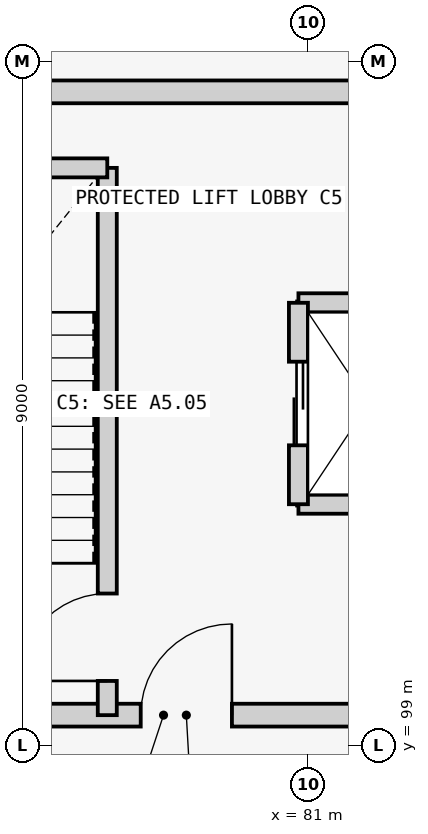
"""IFC4 building model, lengths in metres.
Left out: names, types, materials, properties, quantities, classifications, styles, units other than length and angle.
Written with IfcOpenShell. Run it as: python <this file> out.ifc"""

import sys

from ifc_helpers import new_model, si_unit, direction, frame, frame_2d, origin, place, context, subcontext, project, spatial, rectangle, extrude, element, fill, save


model = new_model("IFC4")
c1 = context("Model", 3, precision=1e-05, world=origin(), true_north=direction((0.0, 1.0)))
c2 = subcontext(c1, "Body", "Model", "MODEL_VIEW")
j1 = project(units=[si_unit("LENGTHUNIT", "METRE"), si_unit("PLANEANGLEUNIT", "RADIAN")], contexts=[c1])
p1 = place(None, origin())
s1 = spatial("IfcSite", under=j1, at=p1, CompositionType="ELEMENT")
p2 = place(p1, origin())
s2 = spatial("IfcBuilding", under=s1, at=p2, CompositionType="ELEMENT")
p3 = place(p2, frame((0.0, 0.0, 8.4)))
s3 = spatial("IfcBuildingStorey", under=s2, at=p3, CompositionType="ELEMENT", Elevation=8.4)
p4 = place(p3, frame((74.0, 99.4, 0.0), z_axis=(0.0, 0.0, 1.0), x_axis=(1.0, 0.0, 0.0)))
e1 = element("IfcWall", 1, at=p4, inside=s3, PredefinedType="SHEAR", context=c2, shape_type="SweptSolid", body=[
    extrude(rectangle(XDim=10.2, YDim=0.3, at=frame_2d((5.1, 0.0))), origin(), (0.0, 0.0, 1.0), 3.935),
])
p5 = place(p4, frame((4.8, 0.0, 0.0)))
e2 = element("IfcOpeningElement", 2, at=p5, cuts=e1, PredefinedType="OPENING", context=c2, shape_type="SweptSolid", body=[
    extrude(rectangle(XDim=1.2, YDim=2.15, at=frame_2d((0.6, 1.075))), frame((0.0, 0.16, 0.0), z_axis=(0.0, -1.0, 0.0), x_axis=(1.0, 0.0, 0.0)), (0.0, 0.0, 1.0), 0.32),
])
p6 = place(p3, frame((84.2, 107.6, 0.0), z_axis=(0.0, 0.0, 1.0), x_axis=(-1.0, 0.0, 0.0)))
e3 = element("IfcWall", 3, at=p6, inside=s3, PredefinedType="SHEAR", context=c2, shape_type="SweptSolid", body=[
    extrude(rectangle(XDim=10.2, YDim=0.3, at=frame_2d((5.1, 0.0))), origin(), (0.0, 0.0, 1.0), 3.935),
])
p7 = place(p3, frame((78.36, 99.4, 0.0), z_axis=(0.0, 0.0, 1.0), x_axis=(0.0, 1.0, 0.0)))
e4 = element("IfcWall", 4, at=p7, inside=s3, PredefinedType="SHEAR", context=c2, shape_type="SweptSolid", body=[
    extrude(rectangle(XDim=7.2, YDim=0.25, at=frame_2d((3.6, 0.0))), origin(), (0.0, 0.0, 1.0), 3.935),
])
p8 = place(p7, frame((0.45, 0.0, 0.0)))
e5 = element("IfcOpeningElement", 5, at=p8, cuts=e4, PredefinedType="OPENING", context=c2, shape_type="SweptSolid", body=[
    extrude(rectangle(XDim=1.15, YDim=2.15, at=frame_2d((0.575, 1.075))), frame((0.0, 0.135, 0.0), z_axis=(0.0, -1.0, 0.0), x_axis=(1.0, 0.0, 0.0)), (0.0, 0.0, 1.0), 0.27),
])
p9 = place(p3, frame((74.0, 106.6, 0.0), z_axis=(0.0, 0.0, 1.0), x_axis=(1.0, 0.0, 0.0)))
e6 = element("IfcWall", 6, at=p9, inside=s3, PredefinedType="SHEAR", context=c2, shape_type="SweptSolid", body=[
    extrude(rectangle(XDim=4.36, YDim=0.25, at=frame_2d((2.18, 0.0))), origin(), (0.0, 0.0, 1.0), 3.935),
])
for number, where, z_axis, x_axis in (
    (7, (80.875, 102.175, 0.0), (0.0, 0.0, 1.0), (1.0, 0.0, 0.0)),
    (8, (80.875, 104.825, 0.0), (0.0, 0.0, 1.0), (1.0, 0.0, 0.0)),
):
    element("IfcWall", number, at=place(p3, frame(where, z_axis=z_axis, x_axis=x_axis)), inside=s3, PredefinedType="SHEAR", context=c2, shape_type="SweptSolid", body=[
        extrude(rectangle(XDim=1.85, YDim=0.25, at=frame_2d((0.925, 0.0))), origin(), (0.0, 0.0, 1.0), 3.935),
    ])
p10 = place(p3, frame((80.875, 102.175, 0.0), z_axis=(0.0, 0.0, 1.0), x_axis=(0.0, 1.0, 0.0)))
e9 = element("IfcWall", 9, at=p10, inside=s3, PredefinedType="SHEAR", context=c2, shape_type="SweptSolid", body=[
    extrude(rectangle(XDim=2.65, YDim=0.25, at=frame_2d((1.325, 0.0))), origin(), (0.0, 0.0, 1.0), 3.935),
])
p11 = place(p10, frame((0.775, 0.0, 0.0)))
e10 = element("IfcOpeningElement", 10, at=p11, cuts=e9, PredefinedType="OPENING", context=c2, shape_type="SweptSolid", body=[
    extrude(rectangle(XDim=1.1, YDim=2.15, at=frame_2d((0.55, 1.075))), frame((0.0, 0.135, 0.0), z_axis=(0.0, -1.0, 0.0), x_axis=(1.0, 0.0, 0.0)), (0.0, 0.0, 1.0), 0.27),
])
p12 = place(p8, origin())
e11 = element("IfcDoor", 11, at=p12, inside=s3, OperationType="SINGLE_SWING_LEFT", PredefinedType="DOOR", context=c2, shape_type="SweptSolid", body=[
    extrude(rectangle(XDim=1.15, YDim=2.15, at=frame_2d((0.575, 1.075))), frame((0.0, 0.025, 0.0), z_axis=(0.0, -1.0, 0.0), x_axis=(1.0, 0.0, 0.0)), (0.0, 0.0, 1.0), 0.05),
])
fill(e5, e11)
p13 = place(p5, origin())
e12 = element("IfcDoor", 12, at=p13, inside=s3, OperationType="SINGLE_SWING_RIGHT", PredefinedType="DOOR", context=c2, shape_type="SweptSolid", body=[
    extrude(rectangle(XDim=1.2, YDim=2.15, at=frame_2d((0.6, 1.075))), frame((0.0, 0.025, 0.0), z_axis=(0.0, -1.0, 0.0), x_axis=(1.0, 0.0, 0.0)), (0.0, 0.0, 1.0), 0.05),
])
fill(e2, e12)
p14 = place(p11, origin())
e13 = element("IfcDoor", 13, at=p14, inside=s3, OperationType="DOUBLE_DOOR_SLIDING", PredefinedType="USERDEFINED", context=c2, shape_type="SweptSolid", body=[
    extrude(rectangle(XDim=1.1, YDim=2.15, at=frame_2d((0.55, 1.075))), frame((0.0, 0.025, 0.0), z_axis=(0.0, -1.0, 0.0), x_axis=(1.0, 0.0, 0.0)), (0.0, 0.0, 1.0), 0.05),
])
fill(e10, e13)
save(model, sys.argv[1])
